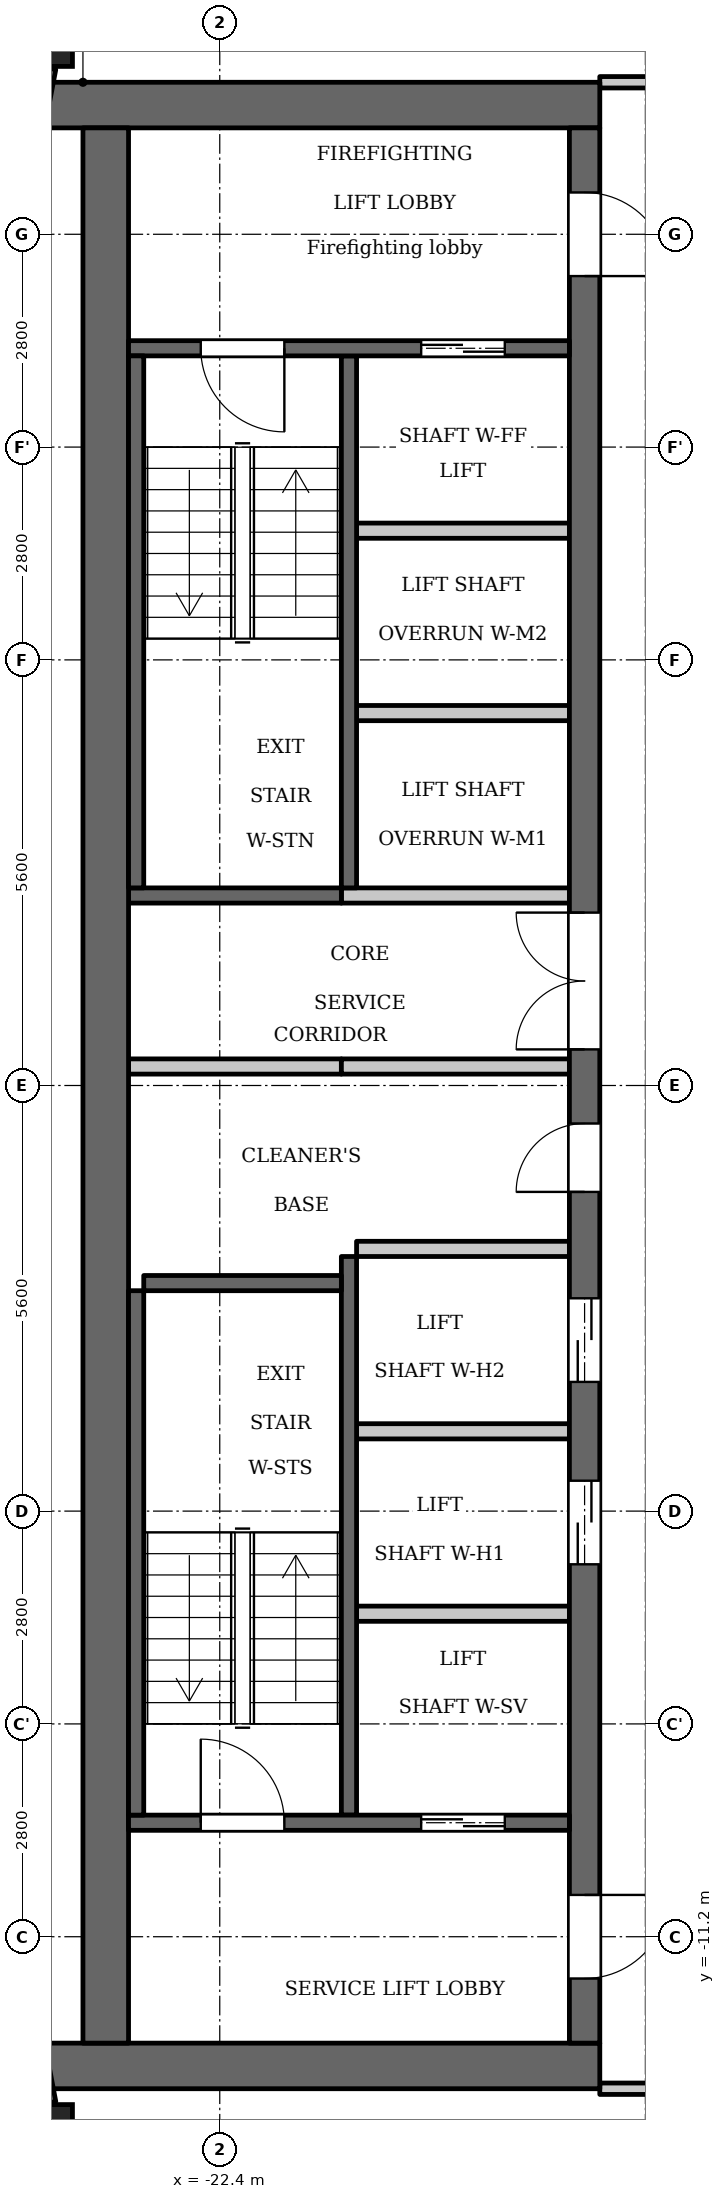
"""IFC4 building model, lengths in metres.
Left out: names, types, materials, properties, quantities, classifications, styles, units other than length and angle.
Written with IfcOpenShell. Run it as: python <this file> out.ifc"""

import sys

from ifc_helpers import new_model, si_unit, direction, frame, frame_2d, origin, origin_2d, place, context, subcontext, project, spatial, rectangle, extrude, element, fill, save


model = new_model("IFC4")
c1 = context("Model", 3, precision=1e-05, world=origin(), true_north=direction((0.0, 1.0)))
c2 = subcontext(c1, "Body", "Model", "MODEL_VIEW")
j1 = project(units=[si_unit("LENGTHUNIT", "METRE"), si_unit("PLANEANGLEUNIT", "RADIAN")], contexts=[c1])
p1 = place(None, origin())
s1 = spatial("IfcSite", under=j1, at=p1, CompositionType="ELEMENT")
p2 = place(p1, origin())
s2 = spatial("IfcBuilding", under=s1, at=p2, CompositionType="ELEMENT")
p3 = place(p2, frame((0.0, 0.0, 245.2)))
s3 = spatial("IfcBuildingStorey", under=s2, at=p3, CompositionType="ELEMENT", Elevation=245.2)
for number, where, z_axis, x_axis in (
    (1, (-24.738, 13.809, 0.0), (0.0, 0.0, 1.0), (1.0, 0.0, 0.0)),
    (2, (-24.738, -13.809, 0.0), (0.0, 0.0, 1.0), (1.0, 0.0, 0.0)),
):
    element("IfcColumn", number, at=place(p3, frame(where, z_axis=z_axis, x_axis=x_axis)), inside=s3, PredefinedType="COLUMN", context=c2, shape_type="SweptSolid", body=[
        extrude(rectangle(XDim=0.8, YDim=0.8, at=origin_2d()), origin(), (0.0, 0.0, 1.0), 3.5),
    ])
for number, where, z_axis, x_axis in (
    (3, (-24.705, 13.395, 0.0), (0.0, 0.0, 1.0), (-0.187, -0.982, 0.0)),
    (4, (-25.053, -11.572, 0.0), (0.0, 0.0, 1.0), (0.187, -0.982, 0.0)),
):
    element("IfcWall", number, at=place(p3, frame(where, z_axis=z_axis, x_axis=x_axis)), inside=s3, PredefinedType="SOLIDWALL", context=c2, shape_type="SweptSolid", body=[
        extrude(rectangle(XDim=1.856, YDim=0.3, at=frame_2d((0.928, 0.0))), origin(), (0.0, 0.0, 1.0), 2.55),
    ])
p4 = place(p3, frame((-20.7, 2.6, 0.0), z_axis=(0.0, 0.0, 1.0), x_axis=(0.0, 1.0, 0.0)))
e5 = element("IfcWall", 5, at=p4, inside=s3, PredefinedType="SHEAR", context=c2, shape_type="SweptSolid", body=[
    extrude(rectangle(XDim=7.0, YDim=0.2, at=frame_2d((3.5, 0.0))), origin(), (0.0, 0.0, 1.0), 3.2),
])
p5 = place(p3, frame((-20.7, -9.6, 0.0), z_axis=(0.0, 0.0, 1.0), x_axis=(0.0, 1.0, 0.0)))
e6 = element("IfcWall", 6, at=p5, inside=s3, PredefinedType="SHEAR", context=c2, shape_type="SweptSolid", body=[
    extrude(rectangle(XDim=7.35, YDim=0.2, at=frame_2d((3.675, 0.0))), origin(), (0.0, 0.0, 1.0), 3.2),
])
p6 = place(p3, frame((-20.8, 2.5, 0.0), z_axis=(0.0, 0.0, 1.0), x_axis=(-1.0, 0.0, 0.0)))
e7 = element("IfcWall", 7, at=p6, inside=s3, PredefinedType="SHEAR", context=c2, shape_type="SweptSolid", body=[
    extrude(rectangle(XDim=2.8, YDim=0.2, at=frame_2d((1.4, 0.0))), origin(), (0.0, 0.0, 1.0), 3.2),
])
p7 = place(p3, frame((-20.8, 0.25, 0.0), z_axis=(0.0, 0.0, 1.0), x_axis=(-1.0, 0.0, 0.0)))
e8 = element("IfcWall", 8, at=p7, inside=s3, PredefinedType="PARTITIONING", context=c2, shape_type="SweptSolid", body=[
    extrude(rectangle(XDim=2.8, YDim=0.2, at=frame_2d((1.4, 0.0))), origin(), (0.0, 0.0, 1.0), 3.2),
])
for number, where, z_axis, x_axis in (
    (9, (-17.4, 12.9, 0.0), (0.0, 0.0, 1.0), (-1.0, 0.0, 0.0)),
    (10, (-17.4, -12.9, 0.0), (0.0, 0.0, 1.0), (-1.0, 0.0, 0.0)),
):
    element("IfcWall", number, at=place(p3, frame(where, z_axis=z_axis, x_axis=x_axis)), inside=s3, PredefinedType="SHEAR", context=c2, shape_type="SweptSolid", body=[
        extrude(rectangle(XDim=7.32, YDim=0.6, at=frame_2d((3.66, 0.0))), origin(), (0.0, 0.0, 1.0), 3.2),
    ])
p8 = place(p3, frame((-17.6, -12.6, 0.0), z_axis=(0.0, 0.0, 1.0), x_axis=(0.0, 1.0, 0.0)))
e11 = element("IfcWall", 11, at=p8, inside=s3, PredefinedType="SHEAR", context=c2, shape_type="SweptSolid", body=[
    extrude(rectangle(XDim=25.2, YDim=0.4, at=frame_2d((12.6, 0.0))), origin(), (0.0, 0.0, 1.0), 3.2),
])
p9 = place(p8, frame((6.3, 0.0, 0.0)))
e12 = element("IfcOpeningElement", 12, at=p9, cuts=e11, PredefinedType="OPENING", context=c2, shape_type="SweptSolid", body=[
    extrude(rectangle(XDim=1.1, YDim=2.1, at=frame_2d((0.55, 1.05))), frame((0.0, 0.21, 0.0), z_axis=(0.0, -1.0, 0.0), x_axis=(1.0, 0.0, 0.0)), (0.0, 0.0, 1.0), 0.42),
])
p10 = place(p8, frame((8.7, 0.0, 0.0)))
e13 = element("IfcOpeningElement", 13, at=p10, cuts=e11, PredefinedType="OPENING", context=c2, shape_type="SweptSolid", body=[
    extrude(rectangle(XDim=1.1, YDim=2.1, at=frame_2d((0.55, 1.05))), frame((0.0, 0.21, 0.0), z_axis=(0.0, -1.0, 0.0), x_axis=(1.0, 0.0, 0.0)), (0.0, 0.0, 1.0), 0.42),
])
p11 = place(p8, frame((11.2, 0.0, 0.0)))
e14 = element("IfcOpeningElement", 14, at=p11, cuts=e11, PredefinedType="OPENING", context=c2, shape_type="SweptSolid", body=[
    extrude(rectangle(XDim=0.9, YDim=2.1, at=frame_2d((0.45, 1.05))), frame((0.0, 0.21, 0.0), z_axis=(0.0, -1.0, 0.0), x_axis=(1.0, 0.0, 0.0)), (0.0, 0.0, 1.0), 0.42),
])
p12 = place(p8, frame((23.25, 0.0, 0.0)))
e15 = element("IfcOpeningElement", 15, at=p12, cuts=e11, PredefinedType="OPENING", context=c2, shape_type="SweptSolid", body=[
    extrude(rectangle(XDim=1.1, YDim=2.1, at=frame_2d((0.55, 1.05))), frame((0.0, 0.21, 0.0), z_axis=(0.0, -1.0, 0.0), x_axis=(1.0, 0.0, 0.0)), (0.0, 0.0, 1.0), 0.42),
])
p13 = place(p8, frame((0.85, 0.0, 0.0)))
e16 = element("IfcOpeningElement", 16, at=p13, cuts=e11, PredefinedType="OPENING", context=c2, shape_type="SweptSolid", body=[
    extrude(rectangle(XDim=1.1, YDim=2.1, at=frame_2d((0.55, 1.05))), frame((0.0, 0.21, 0.0), z_axis=(0.0, -1.0, 0.0), x_axis=(1.0, 0.0, 0.0)), (0.0, 0.0, 1.0), 0.42),
])
p14 = place(p8, frame((13.075, 0.0, 0.0)))
e17 = element("IfcOpeningElement", 17, at=p14, cuts=e11, PredefinedType="OPENING", context=c2, shape_type="SweptSolid", body=[
    extrude(rectangle(XDim=1.8, YDim=2.1, at=frame_2d((0.9, 1.05))), frame((0.0, 0.21, 0.0), z_axis=(0.0, -1.0, 0.0), x_axis=(1.0, 0.0, 0.0)), (0.0, 0.0, 1.0), 0.42),
])
p15 = place(p3, frame((-23.9, -12.6, 0.0), z_axis=(0.0, 0.0, 1.0), x_axis=(0.0, 1.0, 0.0)))
e18 = element("IfcWall", 18, at=p15, inside=s3, PredefinedType="SHEAR", context=c2, shape_type="SweptSolid", body=[
    extrude(rectangle(XDim=25.2, YDim=0.6, at=frame_2d((12.6, 0.0))), origin(), (0.0, 0.0, 1.0), 3.2),
])
p16 = place(p3, frame((-17.8, -9.7, 0.0), z_axis=(0.0, 0.0, 1.0), x_axis=(-1.0, 0.0, 0.0)))
e19 = element("IfcWall", 19, at=p16, inside=s3, PredefinedType="SHEAR", context=c2, shape_type="SweptSolid", body=[
    extrude(rectangle(XDim=5.8, YDim=0.2, at=frame_2d((2.9, 0.0))), origin(), (0.0, 0.0, 1.0), 3.2),
])
p17 = place(p16, frame((0.85, 0.0, 0.0)))
e20 = element("IfcOpeningElement", 20, at=p17, cuts=e19, PredefinedType="OPENING", context=c2, shape_type="SweptSolid", body=[
    extrude(rectangle(XDim=1.1, YDim=2.1, at=frame_2d((0.55, 1.05))), frame((0.0, 0.11, 0.0), z_axis=(0.0, -1.0, 0.0), x_axis=(1.0, 0.0, 0.0)), (0.0, 0.0, 1.0), 0.22),
])
p18 = place(p16, frame((3.75, 0.0, 0.0)))
e21 = element("IfcOpeningElement", 21, at=p18, cuts=e19, PredefinedType="OPENING", context=c2, shape_type="SweptSolid", body=[
    extrude(rectangle(XDim=1.1, YDim=2.1, at=frame_2d((0.55, 1.05))), frame((0.0, 0.11, 0.0), z_axis=(0.0, -1.0, 0.0), x_axis=(1.0, 0.0, 0.0)), (0.0, 0.0, 1.0), 0.22),
])
for number, where, z_axis, x_axis in (
    (22, (-17.8, -6.95, 0.0), (0.0, 0.0, 1.0), (-1.0, 0.0, 0.0)),
    (23, (-17.8, -4.55, 0.0), (0.0, 0.0, 1.0), (-1.0, 0.0, 0.0)),
    (24, (-17.8, -2.15, 0.0), (0.0, 0.0, 1.0), (-1.0, 0.0, 0.0)),
):
    element("IfcWall", number, at=place(p3, frame(where, z_axis=z_axis, x_axis=x_axis)), inside=s3, PredefinedType="PARTITIONING", context=c2, shape_type="SweptSolid", body=[
        extrude(rectangle(XDim=2.8, YDim=0.2, at=frame_2d((1.4, 0.0))), origin(), (0.0, 0.0, 1.0), 3.2),
    ])
for number, where, z_axis, x_axis in (
    (25, (-17.8, 0.25, 0.0), (0.0, 0.0, 1.0), (-1.0, 0.0, 0.0)),
    (26, (-17.8, 2.5, 0.0), (0.0, 0.0, 1.0), (-1.0, 0.0, 0.0)),
):
    element("IfcWall", number, at=place(p3, frame(where, z_axis=z_axis, x_axis=x_axis)), inside=s3, PredefinedType="PARTITIONING", context=c2, shape_type="SweptSolid", body=[
        extrude(rectangle(XDim=3.0, YDim=0.2, at=frame_2d((1.5, 0.0))), origin(), (0.0, 0.0, 1.0), 3.2),
    ])
for number, where, z_axis, x_axis in (
    (27, (-17.8, 4.9, 0.0), (0.0, 0.0, 1.0), (-1.0, 0.0, 0.0)),
    (28, (-17.8, 7.3, 0.0), (0.0, 0.0, 1.0), (-1.0, 0.0, 0.0)),
):
    element("IfcWall", number, at=place(p3, frame(where, z_axis=z_axis, x_axis=x_axis)), inside=s3, PredefinedType="PARTITIONING", context=c2, shape_type="SweptSolid", body=[
        extrude(rectangle(XDim=2.8, YDim=0.2, at=frame_2d((1.4, 0.0))), origin(), (0.0, 0.0, 1.0), 3.2),
    ])
p19 = place(p3, frame((-17.8, 9.7, 0.0), z_axis=(0.0, 0.0, 1.0), x_axis=(-1.0, 0.0, 0.0)))
e29 = element("IfcWall", 29, at=p19, inside=s3, PredefinedType="SHEAR", context=c2, shape_type="SweptSolid", body=[
    extrude(rectangle(XDim=5.8, YDim=0.2, at=frame_2d((2.9, 0.0))), origin(), (0.0, 0.0, 1.0), 3.2),
])
p20 = place(p19, frame((0.85, 0.0, 0.0)))
e30 = element("IfcOpeningElement", 30, at=p20, cuts=e29, PredefinedType="OPENING", context=c2, shape_type="SweptSolid", body=[
    extrude(rectangle(XDim=1.1, YDim=2.1, at=frame_2d((0.55, 1.05))), frame((0.0, 0.11, 0.0), z_axis=(0.0, -1.0, 0.0), x_axis=(1.0, 0.0, 0.0)), (0.0, 0.0, 1.0), 0.22),
])
p21 = place(p19, frame((3.75, 0.0, 0.0)))
e31 = element("IfcOpeningElement", 31, at=p21, cuts=e29, PredefinedType="OPENING", context=c2, shape_type="SweptSolid", body=[
    extrude(rectangle(XDim=1.1, YDim=2.1, at=frame_2d((0.55, 1.05))), frame((0.0, 0.11, 0.0), z_axis=(0.0, -1.0, 0.0), x_axis=(1.0, 0.0, 0.0)), (0.0, 0.0, 1.0), 0.22),
])
p22 = place(p3, frame((-23.5, 2.6, 0.0), z_axis=(0.0, 0.0, 1.0), x_axis=(0.0, 1.0, 0.0)))
e32 = element("IfcWall", 32, at=p22, inside=s3, PredefinedType="SHEAR", context=c2, shape_type="SweptSolid", body=[
    extrude(rectangle(XDim=7.0, YDim=0.2, at=frame_2d((3.5, 0.0))), origin(), (0.0, 0.0, 1.0), 3.2),
])
p23 = place(p3, frame((-23.5, -9.6, 0.0), z_axis=(0.0, 0.0, 1.0), x_axis=(0.0, 1.0, 0.0)))
e33 = element("IfcWall", 33, at=p23, inside=s3, PredefinedType="SHEAR", context=c2, shape_type="SweptSolid", body=[
    extrude(rectangle(XDim=6.9, YDim=0.2, at=frame_2d((3.45, 0.0))), origin(), (0.0, 0.0, 1.0), 3.2),
])
p24 = place(p3, frame((-20.8, -2.6, 0.0), z_axis=(0.0, 0.0, 1.0), x_axis=(-1.0, 0.0, 0.0)))
e34 = element("IfcWall", 34, at=p24, inside=s3, PredefinedType="SHEAR", context=c2, shape_type="SweptSolid", body=[
    extrude(rectangle(XDim=2.6, YDim=0.2, at=frame_2d((1.3, 0.0))), origin(), (0.0, 0.0, 1.0), 3.2),
])
p25 = place(p3, frame((-17.4, -13.2, 0.0), z_axis=(0.0, 0.0, 1.0), x_axis=(1.0, 0.0, 0.0)))
e35 = element("IfcWall", 35, at=p25, inside=s3, PredefinedType="PARTITIONING", context=c2, shape_type="SweptSolid", body=[
    extrude(rectangle(XDim=2.325, YDim=0.15, at=frame_2d((1.163, 0.0))), origin(), (0.0, 0.0, 1.0), 3.2),
])
p26 = place(p25, frame((0.65, 0.0, 0.0)))
e36 = element("IfcOpeningElement", 36, at=p26, cuts=e35, PredefinedType="OPENING", context=c2, shape_type="SweptSolid", body=[
    extrude(rectangle(XDim=1.0, YDim=2.1, at=frame_2d((0.5, 1.05))), frame((0.0, 0.085, 0.0), z_axis=(0.0, -1.0, 0.0), x_axis=(1.0, 0.0, 0.0)), (0.0, 0.0, 1.0), 0.17),
])
p27 = place(p3, frame((-17.4, 13.2, 0.0), z_axis=(0.0, 0.0, 1.0), x_axis=(1.0, 0.0, 0.0)))
e37 = element("IfcWall", 37, at=p27, inside=s3, PredefinedType="PARTITIONING", context=c2, shape_type="SweptSolid", body=[
    extrude(rectangle(XDim=2.325, YDim=0.15, at=frame_2d((1.163, 0.0))), origin(), (0.0, 0.0, 1.0), 3.2),
])
p28 = place(p27, frame((0.75, 0.0, 0.0)))
e38 = element("IfcOpeningElement", 38, at=p28, cuts=e37, PredefinedType="OPENING", context=c2, shape_type="SweptSolid", body=[
    extrude(rectangle(XDim=1.0, YDim=2.1, at=frame_2d((0.5, 1.05))), frame((0.0, 0.085, 0.0), z_axis=(0.0, -1.0, 0.0), x_axis=(1.0, 0.0, 0.0)), (0.0, 0.0, 1.0), 0.17),
])
p29 = place(p17, origin())
e39 = element("IfcDoor", 39, at=p29, inside=s3, OperationType="DOUBLE_DOOR_SLIDING", PredefinedType="DOOR", context=c2, shape_type="SweptSolid", body=[
    extrude(rectangle(XDim=1.1, YDim=2.1, at=frame_2d((0.55, 1.05))), frame((0.0, 0.025, 0.0), z_axis=(0.0, -1.0, 0.0), x_axis=(1.0, 0.0, 0.0)), (0.0, 0.0, 1.0), 0.05),
])
fill(e20, e39)
p30 = place(p9, origin())
e40 = element("IfcDoor", 40, at=p30, inside=s3, OperationType="DOUBLE_DOOR_SLIDING", PredefinedType="DOOR", context=c2, shape_type="SweptSolid", body=[
    extrude(rectangle(XDim=1.1, YDim=2.1, at=frame_2d((0.55, 1.05))), frame((0.0, 0.025, 0.0), z_axis=(0.0, -1.0, 0.0), x_axis=(1.0, 0.0, 0.0)), (0.0, 0.0, 1.0), 0.05),
])
fill(e12, e40)
p31 = place(p10, origin())
e41 = element("IfcDoor", 41, at=p31, inside=s3, OperationType="DOUBLE_DOOR_SLIDING", PredefinedType="DOOR", context=c2, shape_type="SweptSolid", body=[
    extrude(rectangle(XDim=1.1, YDim=2.1, at=frame_2d((0.55, 1.05))), frame((0.0, 0.025, 0.0), z_axis=(0.0, -1.0, 0.0), x_axis=(1.0, 0.0, 0.0)), (0.0, 0.0, 1.0), 0.05),
])
fill(e13, e41)
p32 = place(p11, origin())
e42 = element("IfcDoor", 42, at=p32, inside=s3, OperationType="SINGLE_SWING_RIGHT", PredefinedType="DOOR", context=c2, shape_type="SweptSolid", body=[
    extrude(rectangle(XDim=0.9, YDim=2.1, at=frame_2d((0.45, 1.05))), frame((0.0, 0.025, 0.0), z_axis=(0.0, -1.0, 0.0), x_axis=(1.0, 0.0, 0.0)), (0.0, 0.0, 1.0), 0.05),
])
fill(e14, e42)
p33 = place(p20, origin())
e43 = element("IfcDoor", 43, at=p33, inside=s3, OperationType="DOUBLE_DOOR_SLIDING", PredefinedType="DOOR", context=c2, shape_type="SweptSolid", body=[
    extrude(rectangle(XDim=1.1, YDim=2.1, at=frame_2d((0.55, 1.05))), frame((0.0, 0.025, 0.0), z_axis=(0.0, -1.0, 0.0), x_axis=(1.0, 0.0, 0.0)), (0.0, 0.0, 1.0), 0.05),
])
fill(e30, e43)
p34 = place(p12, origin())
e44 = element("IfcDoor", 44, at=p34, inside=s3, OperationType="SINGLE_SWING_LEFT", PredefinedType="DOOR", context=c2, shape_type="SweptSolid", body=[
    extrude(rectangle(XDim=1.1, YDim=2.1, at=frame_2d((0.55, 1.05))), frame((0.0, 0.025, 0.0), z_axis=(0.0, -1.0, 0.0), x_axis=(1.0, 0.0, 0.0)), (0.0, 0.0, 1.0), 0.05),
])
fill(e15, e44)
p35 = place(p13, origin())
e45 = element("IfcDoor", 45, at=p35, inside=s3, OperationType="SINGLE_SWING_RIGHT", PredefinedType="DOOR", context=c2, shape_type="SweptSolid", body=[
    extrude(rectangle(XDim=1.1, YDim=2.1, at=frame_2d((0.55, 1.05))), frame((0.0, 0.025, 0.0), z_axis=(0.0, -1.0, 0.0), x_axis=(1.0, 0.0, 0.0)), (0.0, 0.0, 1.0), 0.05),
])
fill(e16, e45)
p36 = place(p21, origin())
e46 = element("IfcDoor", 46, at=p36, inside=s3, OperationType="SINGLE_SWING_RIGHT", PredefinedType="DOOR", context=c2, shape_type="SweptSolid", body=[
    extrude(rectangle(XDim=1.1, YDim=2.1, at=frame_2d((0.55, 1.05))), frame((0.0, 0.025, 0.0), z_axis=(0.0, -1.0, 0.0), x_axis=(1.0, 0.0, 0.0)), (0.0, 0.0, 1.0), 0.05),
])
fill(e31, e46)
p37 = place(p18, origin())
e47 = element("IfcDoor", 47, at=p37, inside=s3, OperationType="SINGLE_SWING_RIGHT", PredefinedType="DOOR", context=c2, shape_type="SweptSolid", body=[
    extrude(rectangle(XDim=1.1, YDim=2.1, at=frame_2d((0.55, 1.05))), frame((0.0, 0.025, 0.0), z_axis=(0.0, -1.0, 0.0), x_axis=(1.0, 0.0, 0.0)), (0.0, 0.0, 1.0), 0.05),
])
fill(e21, e47)
p38 = place(p14, origin())
e48 = element("IfcDoor", 48, at=p38, inside=s3, OperationType="DOUBLE_DOOR_SINGLE_SWING", PredefinedType="DOOR", context=c2, shape_type="SweptSolid", body=[
    extrude(rectangle(XDim=1.8, YDim=2.1, at=frame_2d((0.9, 1.05))), frame((0.0, 0.025, 0.0), z_axis=(0.0, -1.0, 0.0), x_axis=(1.0, 0.0, 0.0)), (0.0, 0.0, 1.0), 0.05),
])
fill(e17, e48)
save(model, sys.argv[1])
